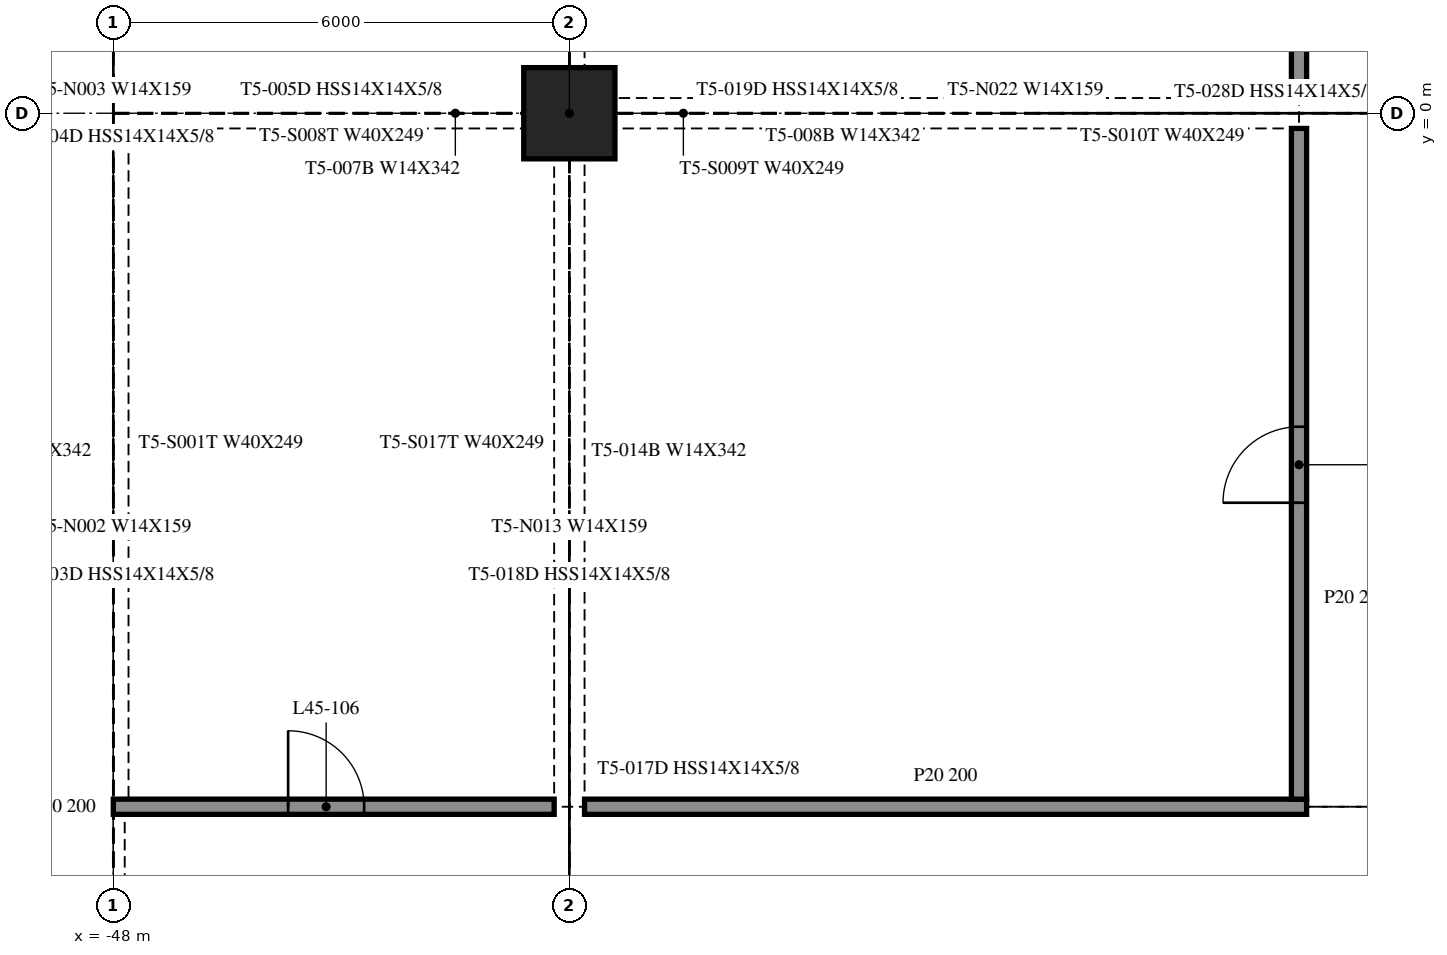
"""IFC4 building model, lengths in metres.
Left out: names, types, materials, properties, quantities, classifications, styles, units other than length and angle.
Written with IfcOpenShell. Run it as: python <this file> out.ifc"""

import sys

from ifc_helpers import new_model, si_unit, direction, frame, frame_2d, origin, origin_2d, place, context, subcontext, project, spatial, rectangle, extrude, element, fill, save


model = new_model("IFC4")
c1 = context("Model", 3, precision=1e-05, world=origin(), true_north=direction((0.0, 1.0)))
c2 = subcontext(c1, "Body", "Model", "MODEL_VIEW")
j1 = project(units=[si_unit("LENGTHUNIT", "METRE"), si_unit("PLANEANGLEUNIT", "RADIAN")], contexts=[c1])
p1 = place(None, origin())
s1 = spatial("IfcSite", under=j1, at=p1, CompositionType="ELEMENT")
p2 = place(p1, origin())
s2 = spatial("IfcBuilding", under=s1, at=p2, CompositionType="ELEMENT")
p3 = place(p2, frame((0.0, 0.0, 189.6)))
s3 = spatial("IfcBuildingStorey", under=s2, at=p3, CompositionType="ELEMENT", Elevation=189.6)
p4 = place(p3, frame((-42.0, 0.0, -0.4), z_axis=(0.0, 0.0, 1.0), x_axis=(1.0, 0.0, 0.0)))
e1 = element("IfcColumn", 1, at=p4, inside=s3, PredefinedType="COLUMN", context=c2, shape_type="SweptSolid", body=[
    extrude(rectangle(XDim=1.2, YDim=1.2, at=origin_2d()), origin(), (0.0, 0.0, 1.0), 4.36),
])
p5 = place(p3, frame((-48.0, -9.125, 0.0), z_axis=(0.0, 0.0, 1.0), x_axis=(1.0, 0.0, 0.0)))
e2 = element("IfcWall", 2, at=p5, inside=s3, PredefinedType="PARTITIONING", context=c2, shape_type="SweptSolid", body=[
    extrude(rectangle(XDim=5.8, YDim=0.2, at=frame_2d((2.9, 0.0))), origin(), (0.0, 0.0, 1.0), 3.96),
])
p6 = place(p5, frame((2.3, 0.0, 0.0)))
e3 = element("IfcOpeningElement", 3, at=p6, cuts=e2, PredefinedType="OPENING", context=c2, shape_type="SweptSolid", body=[
    extrude(rectangle(XDim=1.0, YDim=2.1, at=frame_2d((0.5, 1.05))), frame((0.0, 0.11, 0.0), z_axis=(0.0, -1.0, 0.0), x_axis=(1.0, 0.0, 0.0)), (0.0, 0.0, 1.0), 0.22),
])
p7 = place(p3, frame((-41.8, -9.125, 0.0), z_axis=(0.0, 0.0, 1.0), x_axis=(1.0, 0.0, 0.0)))
e4 = element("IfcWall", 4, at=p7, inside=s3, PredefinedType="PARTITIONING", context=c2, shape_type="SweptSolid", body=[
    extrude(rectangle(XDim=9.5, YDim=0.2, at=frame_2d((4.75, 0.0))), origin(), (0.0, 0.0, 1.0), 3.96),
])
p8 = place(p3, frame((-32.4, -9.025, 0.0), z_axis=(0.0, 0.0, 1.0), x_axis=(0.0, 1.0, 0.0)))
e5 = element("IfcWall", 5, at=p8, inside=s3, PredefinedType="PARTITIONING", context=c2, shape_type="SweptSolid", body=[
    extrude(rectangle(XDim=8.825, YDim=0.2, at=frame_2d((4.413, 0.0))), origin(), (0.0, 0.0, 1.0), 3.96),
])
p9 = place(p8, frame((3.9, 0.0, 0.0)))
e6 = element("IfcOpeningElement", 6, at=p9, cuts=e5, PredefinedType="OPENING", context=c2, shape_type="SweptSolid", body=[
    extrude(rectangle(XDim=1.0, YDim=2.1, at=frame_2d((0.5, 1.05))), frame((0.0, 0.11, 0.0), z_axis=(0.0, -1.0, 0.0), x_axis=(1.0, 0.0, 0.0)), (0.0, 0.0, 1.0), 0.22),
])
p10 = place(p3, frame((-32.4, 0.2, 0.0), z_axis=(0.0, 0.0, 1.0), x_axis=(0.0, 1.0, 0.0)))
e7 = element("IfcWall", 7, at=p10, inside=s3, PredefinedType="PARTITIONING", context=c2, shape_type="SweptSolid", body=[
    extrude(rectangle(XDim=11.1, YDim=0.2, at=frame_2d((5.55, 0.0))), origin(), (0.0, 0.0, 1.0), 3.96),
])
p11 = place(p10, frame((5.1, 0.0, 0.0)))
e8 = element("IfcOpeningElement", 8, at=p11, cuts=e7, PredefinedType="OPENING", context=c2, shape_type="SweptSolid", body=[
    extrude(rectangle(XDim=1.0, YDim=2.1, at=frame_2d((0.5, 1.05))), frame((0.0, 0.11, 0.0), z_axis=(0.0, -1.0, 0.0), x_axis=(1.0, 0.0, 0.0)), (0.0, 0.0, 1.0), 0.22),
])
p12 = place(p6, origin())
e9 = element("IfcDoor", 9, at=p12, inside=s3, OperationType="SINGLE_SWING_LEFT", PredefinedType="DOOR", context=c2, shape_type="SweptSolid", body=[
    extrude(rectangle(XDim=1.0, YDim=2.1, at=frame_2d((0.5, 1.05))), frame((0.0, 0.025, 0.0), z_axis=(0.0, -1.0, 0.0), x_axis=(1.0, 0.0, 0.0)), (0.0, 0.0, 1.0), 0.05),
])
fill(e3, e9)
p13 = place(p9, origin())
e10 = element("IfcDoor", 10, at=p13, inside=s3, OperationType="SINGLE_SWING_LEFT", PredefinedType="DOOR", context=c2, shape_type="SweptSolid", body=[
    extrude(rectangle(XDim=1.0, YDim=2.1, at=frame_2d((0.5, 1.05))), frame((0.0, 0.025, 0.0), z_axis=(0.0, -1.0, 0.0), x_axis=(1.0, 0.0, 0.0)), (0.0, 0.0, 1.0), 0.05),
])
fill(e6, e10)
save(model, sys.argv[1])
